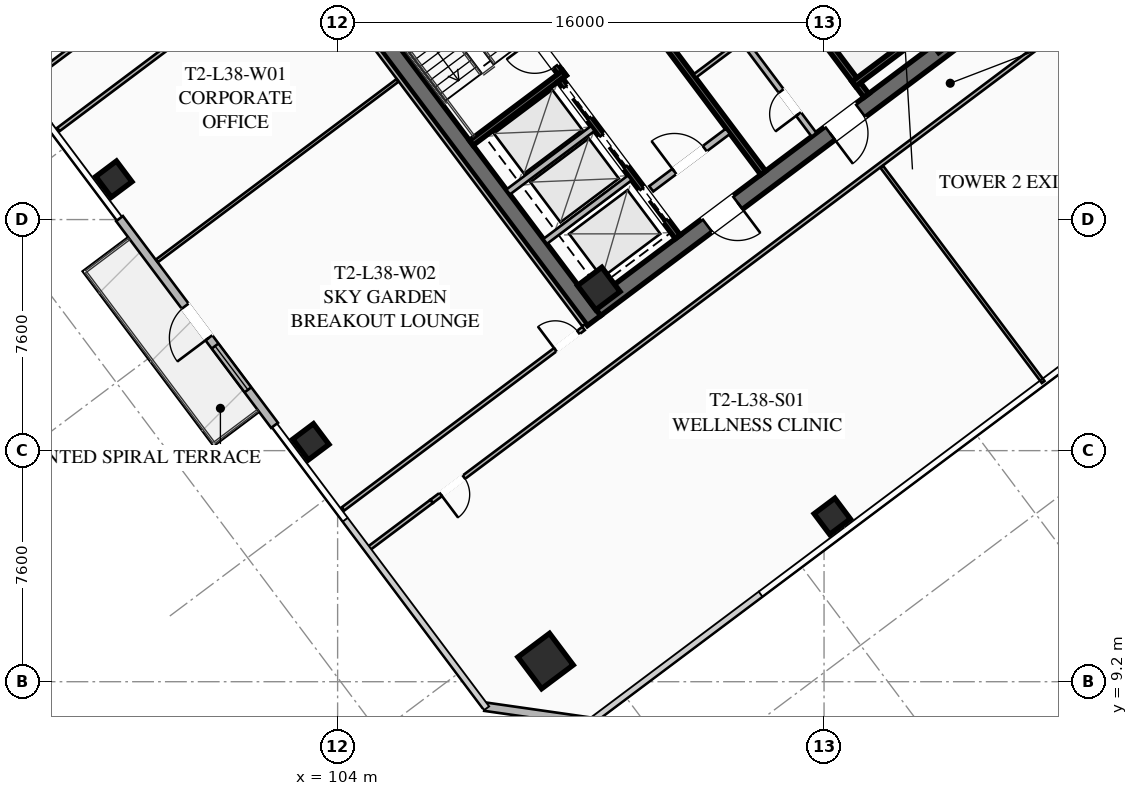
"""IFC4 building model, lengths in metres.
Left out: names, types, materials, properties, quantities, classifications, styles, units other than length and angle.
Written with IfcOpenShell. Run it as: python <this file> out.ifc"""

import sys

from ifc_helpers import new_model, si_unit, direction, frame, frame_2d, origin, origin_2d, place, context, subcontext, project, spatial, rectangle, hollow_rectangle, extrude, element, fill, save


model = new_model("IFC4")
c1 = context("Model", 3, precision=1e-05, world=origin(), true_north=direction((0.0, 1.0)))
c2 = subcontext(c1, "Body", "Model", "MODEL_VIEW")
j1 = project(units=[si_unit("LENGTHUNIT", "METRE"), si_unit("PLANEANGLEUNIT", "RADIAN")], contexts=[c1])
p1 = place(None, origin())
s1 = spatial("IfcSite", under=j1, at=p1, CompositionType="ELEMENT")
p2 = place(p1, origin())
s2 = spatial("IfcBuilding", under=s1, at=p2, CompositionType="ELEMENT")
p3 = place(p2, frame((0.0, 0.0, 142.8)))
s3 = spatial("IfcBuildingStorey", under=s2, at=p3, CompositionType="ELEMENT", Elevation=142.8)
p4 = place(p3, frame((112.436, 21.077, 0.0), z_axis=(0.0, 0.0, 1.0), x_axis=(-0.600005007985, 0.799996243986, 0.0)))
e1 = element("IfcWall", 1, at=p4, inside=s3, PredefinedType="SHEAR", context=c2, shape_type="SweptSolid", body=[
    extrude(rectangle(XDim=15.6, YDim=0.55, at=frame_2d((7.8, 0.0))), origin(), (0.0, 0.0, 1.0), 3.55),
])
p5 = place(p3, frame((124.539, 30.498, 0.0), z_axis=(0.0, 0.0, 1.0), x_axis=(-0.799998054672, -0.600002593761, 0.0)))
e2 = element("IfcWall", 2, at=p5, inside=s3, PredefinedType="SHEAR", context=c2, shape_type="SweptSolid", body=[
    extrude(rectangle(XDim=15.06, YDim=0.55, at=frame_2d((7.53, 0.0))), origin(), (0.0, 0.0, 1.0), 3.55),
])
p6 = place(p5, frame((9.23, 0.0, 0.0)))
e3 = element("IfcOpeningElement", 3, at=p6, cuts=e2, PredefinedType="OPENING", context=c2, shape_type="SweptSolid", body=[
    extrude(rectangle(XDim=1.25, YDim=2.25, at=frame_2d((0.625, 1.125))), frame((0.0, 0.285, 0.0), z_axis=(0.0, -1.0, 0.0), x_axis=(1.0, 0.0, 0.0)), (0.0, 0.0, 1.0), 0.57),
])
p7 = place(p5, frame((4.18, 0.0, 0.0)))
e4 = element("IfcOpeningElement", 4, at=p7, cuts=e2, PredefinedType="OPENING", context=c2, shape_type="SweptSolid", body=[
    extrude(rectangle(XDim=1.25, YDim=2.25, at=frame_2d((0.625, 1.125))), frame((0.0, 0.285, 0.0), z_axis=(0.0, -1.0, 0.0), x_axis=(1.0, 0.0, 0.0)), (0.0, 0.0, 1.0), 0.57),
])
for number, where, z_axis, x_axis in (
    (5, (112.59, 22.13, 0.0), (0.0, 0.0, 1.0), (0.8, 0.6, 0.0)),
    (6, (123.87, 30.59, 0.0), (0.0, 0.0, 1.0), (0.8, 0.6, 0.0)),
):
    element("IfcColumn", number, at=place(p3, frame(where, z_axis=z_axis, x_axis=x_axis)), inside=s3, PredefinedType="COLUMN", context=c2, shape_type="SweptSolid", body=[
        extrude(hollow_rectangle(XDim=1.0, YDim=1.0, WallThickness=0.04, at=origin_2d()), origin(), (0.0, 0.0, 1.0), 3.37),
    ])
p8 = place(p3, frame((110.84, 9.88, 0.0), z_axis=(0.0, 0.0, 1.0), x_axis=(0.799999996291, 0.600000004945, 0.0)))
e7 = element("IfcColumn", 7, at=p8, inside=s3, PredefinedType="COLUMN", context=c2, shape_type="SweptSolid", body=[
    extrude(hollow_rectangle(XDim=1.3, YDim=1.3, WallThickness=0.05, at=origin_2d()), origin(), (0.0, 0.0, 1.0), 3.37),
])
for number, where, z_axis, x_axis in (
    (8, (120.27, 14.64, 0.0), (0.0, 0.0, 1.0), (0.8, 0.6, 0.0)),
    (9, (96.64, 25.73, 0.0), (0.0, 0.0, 1.0), (0.8, 0.6, 0.0)),
    (10, (103.12, 17.09, 0.0), (0.0, 0.0, 1.0), (0.8, 0.6, 0.0)),
):
    element("IfcColumn", number, at=place(p3, frame(where, z_axis=z_axis, x_axis=x_axis)), inside=s3, PredefinedType="COLUMN", context=c2, shape_type="SweptSolid", body=[
        extrude(hollow_rectangle(XDim=0.85, YDim=0.85, WallThickness=0.035, at=origin_2d()), origin(), (0.0, 0.0, 1.0), 3.37),
    ])
p9 = place(p3, frame((101.926, 17.632, 0.0), z_axis=(0.0, 0.0, 1.0), x_axis=(-0.600018382406, 0.799986212866, 0.0)))
e11 = element("IfcWall", 11, at=p9, inside=s3, PredefinedType="SOLIDWALL", context=c2, shape_type="SweptSolid", body=[
    extrude(rectangle(XDim=8.5, YDim=0.28, at=frame_2d((4.25, 0.0))), origin(), (0.0, 0.0, 1.0), 3.37),
])
p10 = place(p9, frame((3.6, 0.0, 0.0)))
e12 = element("IfcOpeningElement", 12, at=p10, cuts=e11, PredefinedType="OPENING", context=c2, shape_type="SweptSolid", body=[
    extrude(rectangle(XDim=1.3, YDim=2.15, at=frame_2d((0.65, 1.075))), frame((0.0, 0.15, 0.0), z_axis=(0.0, -1.0, 0.0), x_axis=(1.0, 0.0, 0.0)), (0.0, 0.0, 1.0), 0.3),
])
p11 = place(p9, frame((1.46, 0.0, 0.85)))
e13 = element("IfcOpeningElement", 13, at=p11, cuts=e11, PredefinedType="OPENING", context=c2, shape_type="SweptSolid", body=[
    extrude(rectangle(XDim=1.8, YDim=1.92, at=frame_2d((0.9, 0.96))), frame((0.0, 0.15, 0.0), z_axis=(0.0, -1.0, 0.0), x_axis=(1.0, 0.0, 0.0)), (0.0, 0.0, 1.0), 0.3),
])
p12 = place(p3, frame((112.34, 7.88, 0.0), z_axis=(0.0, 0.0, 1.0), x_axis=(-0.989949493661, 0.141421356237, 0.0)))
e14 = element("IfcWall", 14, at=p12, inside=s3, PredefinedType="SOLIDWALL", context=c2, shape_type="SweptSolid", body=[
    extrude(rectangle(XDim=3.536, YDim=0.28, at=frame_2d((1.768, 0.0))), origin(), (0.0, 0.0, 1.0), 3.37),
])
p13 = place(p3, frame((111.44, 29.08, 0.0), z_axis=(0.0, 0.0, 1.0), x_axis=(-0.59999029481, 0.8000072788, 0.0)))
e15 = element("IfcWall", 15, at=p13, inside=s3, PredefinedType="SHEAR", context=c2, shape_type="SweptSolid", body=[
    extrude(rectangle(XDim=8.05, YDim=0.2, at=frame_2d((4.025, 0.0))), origin(), (0.0, 0.0, 1.0), 3.37),
])
p14 = place(p13, frame((0.45, 0.0, 0.0)))
e16 = element("IfcOpeningElement", 16, at=p14, cuts=e15, PredefinedType="OPENING", context=c2, shape_type="SweptSolid", body=[
    extrude(rectangle(XDim=1.15, YDim=2.2, at=frame_2d((0.575, 1.1))), frame((0.0, 0.11, 0.0), z_axis=(0.0, -1.0, 0.0), x_axis=(1.0, 0.0, 0.0)), (0.0, 0.0, 1.0), 0.22),
])
p15 = place(p3, frame((108.396, 26.922, 0.0), z_axis=(0.0, 0.0, 1.0), x_axis=(0.800015298837, 0.599979601008, 0.0)))
e17 = element("IfcWall", 17, at=p15, inside=s3, PredefinedType="SHEAR", context=c2, shape_type="SweptSolid", body=[
    extrude(rectangle(XDim=3.83, YDim=0.2, at=frame_2d((1.915, 0.0))), origin(), (0.0, 0.0, 1.0), 3.37),
])
p16 = place(p3, frame((116.56, 34.92, 0.0), z_axis=(0.0, 0.0, 1.0), x_axis=(0.59999029481, -0.8000072788, 0.0)))
e18 = element("IfcWall", 18, at=p16, inside=s3, PredefinedType="SHEAR", context=c2, shape_type="SweptSolid", body=[
    extrude(rectangle(XDim=8.05, YDim=0.2, at=frame_2d((4.025, 0.0))), origin(), (0.0, 0.0, 1.0), 3.37),
])
p17 = place(p16, frame((0.45, 0.0, 0.0)))
e19 = element("IfcOpeningElement", 19, at=p17, cuts=e18, PredefinedType="OPENING", context=c2, shape_type="SweptSolid", body=[
    extrude(rectangle(XDim=1.15, YDim=2.2, at=frame_2d((0.575, 1.1))), frame((0.0, 0.11, 0.0), z_axis=(0.0, -1.0, 0.0), x_axis=(1.0, 0.0, 0.0)), (0.0, 0.0, 1.0), 0.22),
])
p18 = place(p3, frame((120.98, 28.86, 0.0), z_axis=(0.0, 0.0, 1.0), x_axis=(0.800015298837, 0.599979601008, 0.0)))
e20 = element("IfcWall", 20, at=p18, inside=s3, PredefinedType="SHEAR", context=c2, shape_type="SweptSolid", body=[
    extrude(rectangle(XDim=3.83, YDim=0.2, at=frame_2d((1.915, 0.0))), origin(), (0.0, 0.0, 1.0), 3.37),
])
p19 = place(p3, frame((117.998, 25.936, 0.0), z_axis=(0.0, 0.0, 1.0), x_axis=(-0.600002693989, 0.799997979501, 0.0)))
e21 = element("IfcWall", 21, at=p19, inside=s3, PredefinedType="SHEAR", context=c2, shape_type="SweptSolid", body=[
    extrude(rectangle(XDim=14.5, YDim=0.2, at=frame_2d((7.25, 0.0))), origin(), (0.0, 0.0, 1.0), 3.37),
])
p20 = place(p3, frame((114.316, 25.412, 0.0), z_axis=(0.0, 0.0, 1.0), x_axis=(0.800018601094, 0.59997519774, 0.0)))
e22 = element("IfcWall", 22, at=p20, inside=s3, PredefinedType="SOLIDWALL", context=c2, shape_type="SweptSolid", body=[
    extrude(rectangle(XDim=3.15, YDim=0.22, at=frame_2d((1.575, 0.0))), origin(), (0.0, 0.0, 1.0), 2.723),
])
p21 = place(p20, frame((0.95, 0.0, 0.0)))
e23 = element("IfcOpeningElement", 23, at=p21, cuts=e22, PredefinedType="OPENING", context=c2, shape_type="SweptSolid", body=[
    extrude(rectangle(XDim=1.25, YDim=2.25, at=frame_2d((0.625, 1.125))), frame((0.0, 0.12, 0.0), z_axis=(0.0, -1.0, 0.0), x_axis=(1.0, 0.0, 0.0)), (0.0, 0.0, 1.0), 0.24),
])
p22 = place(p3, frame((115.19, 23.83, 0.0), z_axis=(0.0, 0.0, 1.0), x_axis=(-0.599993943644, 0.800004542231, 0.0)))
e24 = element("IfcWall", 24, at=p22, inside=s3, PredefinedType="SHEAR", context=c2, shape_type="SweptSolid", body=[
    extrude(rectangle(XDim=6.45, YDim=0.2, at=frame_2d((3.225, 0.0))), origin(), (0.0, 0.0, 1.0), 3.37),
])
p23 = place(p22, frame((4.875, 0.0, 0.0)))
e25 = element("IfcOpeningElement", 25, at=p23, cuts=e24, PredefinedType="OPENING", context=c2, shape_type="SweptSolid", body=[
    extrude(rectangle(XDim=1.3, YDim=2.25, at=frame_2d((0.65, 1.125))), frame((0.0, 0.11, 0.0), z_axis=(0.0, -1.0, 0.0), x_axis=(1.0, 0.0, 0.0)), (0.0, 0.0, 1.0), 0.22),
])
p24 = place(p22, frame((2.875, 0.0, 0.0)))
e26 = element("IfcOpeningElement", 26, at=p24, cuts=e24, PredefinedType="OPENING", context=c2, shape_type="SweptSolid", body=[
    extrude(rectangle(XDim=1.3, YDim=2.25, at=frame_2d((0.65, 1.125))), frame((0.0, 0.11, 0.0), z_axis=(0.0, -1.0, 0.0), x_axis=(1.0, 0.0, 0.0)), (0.0, 0.0, 1.0), 0.22),
])
p25 = place(p22, frame((0.675, 0.0, 0.0)))
e27 = element("IfcOpeningElement", 27, at=p25, cuts=e24, PredefinedType="OPENING", context=c2, shape_type="SweptSolid", body=[
    extrude(rectangle(XDim=1.3, YDim=2.25, at=frame_2d((0.65, 1.125))), frame((0.0, 0.11, 0.0), z_axis=(0.0, -1.0, 0.0), x_axis=(1.0, 0.0, 0.0)), (0.0, 0.0, 1.0), 0.22),
])
for number, where, z_axis, x_axis in (
    (28, (110.826, 23.682, 0.0), (0.0, 0.0, 1.0), (0.8, 0.6, 0.0)),
    (29, (109.608, 25.306, 0.0), (0.0, 0.0, 1.0), (0.8, 0.6, 0.0)),
):
    element("IfcWall", number, at=place(p3, frame(where, z_axis=z_axis, x_axis=x_axis)), inside=s3, PredefinedType="SOLIDWALL", context=c2, shape_type="SweptSolid", body=[
        extrude(rectangle(XDim=3.48, YDim=0.2, at=frame_2d((1.74, 0.0))), origin(), (0.0, 0.0, 1.0), 3.37),
    ])
p26 = place(p3, frame((119.67, 27.19, 0.0), z_axis=(0.0, 0.0, 1.0), x_axis=(-0.599988677396, 0.800008491828, 0.0)))
e30 = element("IfcWall", 30, at=p26, inside=s3, PredefinedType="SOLIDWALL", context=c2, shape_type="SweptSolid", body=[
    extrude(rectangle(XDim=6.9, YDim=0.2, at=frame_2d((3.45, 0.0))), origin(), (0.0, 0.0, 1.0), 2.723),
])
p27 = place(p26, frame((0.85, 0.0, 0.0)))
e31 = element("IfcOpeningElement", 31, at=p27, cuts=e30, PredefinedType="OPENING", context=c2, shape_type="SweptSolid", body=[
    extrude(rectangle(XDim=0.95, YDim=2.05, at=frame_2d((0.475, 1.025))), frame((0.0, 0.11, 0.0), z_axis=(0.0, -1.0, 0.0), x_axis=(1.0, 0.0, 0.0)), (0.0, 0.0, 1.0), 0.22),
])
p28 = place(p26, frame((4.8, 0.0, 0.0)))
e32 = element("IfcOpeningElement", 32, at=p28, cuts=e30, PredefinedType="OPENING", context=c2, shape_type="SweptSolid", body=[
    extrude(rectangle(XDim=1.05, YDim=2.2, at=frame_2d((0.525, 1.1))), frame((0.0, 0.11, 0.0), z_axis=(0.0, -1.0, 0.0), x_axis=(1.0, 0.0, 0.0)), (0.0, 0.0, 1.0), 0.22),
])
p29 = place(p3, frame((115.746, 29.122, 0.0), z_axis=(0.0, 0.0, 1.0), x_axis=(0.8, 0.6, 0.0)))
e33 = element("IfcWall", 33, at=p29, inside=s3, PredefinedType="PARTITIONING", context=c2, shape_type="SweptSolid", body=[
    extrude(rectangle(XDim=1.88, YDim=0.135, at=frame_2d((0.94, 0.0))), origin(), (0.0, 0.0, 1.0), 2.723),
])
p30 = place(p3, frame((93.574, 28.768, 0.0), z_axis=(0.0, 0.0, 1.0), x_axis=(0.80002227902, 0.599970293491, 0.0)))
e34 = element("IfcWall", 34, at=p30, inside=s3, PredefinedType="PARTITIONING", context=c2, shape_type="SweptSolid", body=[
    extrude(rectangle(XDim=2.63, YDim=0.135, at=frame_2d((1.315, 0.0))), origin(), (0.0, 0.0, 1.0), 2.723),
])
p31 = place(p3, frame((132.13, 33.91, 0.0), z_axis=(0.0, 0.0, 1.0), x_axis=(-0.799997191971, -0.600003744021, 0.0)))
e35 = element("IfcWall", 35, at=p31, inside=s3, PredefinedType="PARTITIONING", context=c2, shape_type="SweptSolid", body=[
    extrude(rectangle(XDim=31.3, YDim=0.135, at=frame_2d((15.65, 0.0))), origin(), (0.0, 0.0, 1.0), 2.723),
])
p32 = place(p31, frame((29.97, 0.0, 0.0)))
e36 = element("IfcOpeningElement", 36, at=p32, cuts=e35, PredefinedType="OPENING", context=c2, shape_type="SweptSolid", body=[
    extrude(rectangle(XDim=0.95, YDim=2.05, at=frame_2d((0.475, 1.025))), frame((0.0, 0.077, 0.0), z_axis=(0.0, -1.0, 0.0), x_axis=(1.0, 0.0, 0.0)), (0.0, 0.0, 1.0), 0.155),
])
p33 = place(p31, frame((0.38, 0.0, 0.0)))
e37 = element("IfcOpeningElement", 37, at=p33, cuts=e35, PredefinedType="OPENING", context=c2, shape_type="SweptSolid", body=[
    extrude(rectangle(XDim=0.95, YDim=2.05, at=frame_2d((0.475, 1.025))), frame((0.0, 0.077, 0.0), z_axis=(0.0, -1.0, 0.0), x_axis=(1.0, 0.0, 0.0)), (0.0, 0.0, 1.0), 0.155),
])
p34 = place(p3, frame((104.986, 13.552, 0.0), z_axis=(0.0, 0.0, 1.0), x_axis=(0.80002227902, 0.599970293491, 0.0)))
e38 = element("IfcWall", 38, at=p34, inside=s3, PredefinedType="PARTITIONING", context=c2, shape_type="SweptSolid", body=[
    extrude(rectangle(XDim=2.63, YDim=0.135, at=frame_2d((1.315, 0.0))), origin(), (0.0, 0.0, 1.0), 2.723),
])
p35 = place(p3, frame((127.208, 19.056, 0.0), z_axis=(0.0, 0.0, 1.0), x_axis=(-0.6, 0.8, 0.0)))
e39 = element("IfcWall", 39, at=p35, inside=s3, PredefinedType="PARTITIONING", context=c2, shape_type="SweptSolid", body=[
    extrude(rectangle(XDim=8.85, YDim=0.11, at=frame_2d((4.425, 0.0))), origin(), (0.0, 0.0, 1.0), 2.723),
])
p36 = place(p3, frame((112.104, 20.928, 0.0), z_axis=(0.0, 0.0, 1.0), x_axis=(-0.599994940075, 0.800003794918, 0.0)))
e40 = element("IfcWall", 40, at=p36, inside=s3, PredefinedType="PARTITIONING", context=c2, shape_type="SweptSolid", body=[
    extrude(rectangle(XDim=15.44, YDim=0.135, at=frame_2d((7.72, 0.0))), origin(), (0.0, 0.0, 1.0), 2.723),
])
p37 = place(p3, frame((102.728, 33.296, 0.0), z_axis=(0.0, 0.0, 1.0), x_axis=(-0.800011848946, -0.599984201081, 0.0)))
e41 = element("IfcWall", 41, at=p37, inside=s3, PredefinedType="PARTITIONING", context=c2, shape_type="SweptSolid", body=[
    extrude(rectangle(XDim=9.89, YDim=0.135, at=frame_2d((4.945, 0.0))), origin(), (0.0, 0.0, 1.0), 2.723),
])
p38 = place(p37, frame((0.5, 0.0, 0.0)))
e42 = element("IfcOpeningElement", 42, at=p38, cuts=e41, PredefinedType="OPENING", context=c2, shape_type="SweptSolid", body=[
    extrude(rectangle(XDim=0.95, YDim=2.05, at=frame_2d((0.475, 1.025))), frame((0.0, 0.077, 0.0), z_axis=(0.0, -1.0, 0.0), x_axis=(1.0, 0.0, 0.0)), (0.0, 0.0, 1.0), 0.155),
])
p39 = place(p3, frame((104.176, 14.882, 0.0), z_axis=(0.0, 0.0, 1.0), x_axis=(0.800002962324, 0.599996050214, 0.0)))
e43 = element("IfcWall", 43, at=p39, inside=s3, PredefinedType="PARTITIONING", context=c2, shape_type="SweptSolid", body=[
    extrude(rectangle(XDim=9.89, YDim=0.135, at=frame_2d((4.945, 0.0))), origin(), (0.0, 0.0, 1.0), 2.723),
])
p40 = place(p39, frame((8.73, 0.0, 0.0)))
e44 = element("IfcOpeningElement", 44, at=p40, cuts=e43, PredefinedType="OPENING", context=c2, shape_type="SweptSolid", body=[
    extrude(rectangle(XDim=0.95, YDim=2.05, at=frame_2d((0.475, 1.025))), frame((0.0, 0.077, 0.0), z_axis=(0.0, -1.0, 0.0), x_axis=(1.0, 0.0, 0.0)), (0.0, 0.0, 1.0), 0.155),
])
p41 = place(p3, frame((98.056, 23.042, 0.0), z_axis=(0.0, 0.0, 1.0), x_axis=(0.8, 0.6, 0.0)))
e45 = element("IfcWall", 45, at=p41, inside=s3, PredefinedType="PARTITIONING", context=c2, shape_type="SweptSolid", body=[
    extrude(rectangle(XDim=9.89, YDim=0.11, at=frame_2d((4.945, 0.0))), origin(), (0.0, 0.0, 1.0), 2.723),
])
p42 = place(p10, origin())
e46 = element("IfcDoor", 46, at=p42, inside=s3, OperationType="SINGLE_SWING_LEFT", PredefinedType="DOOR", context=c2, shape_type="SweptSolid", body=[
    extrude(rectangle(XDim=1.3, YDim=2.15, at=frame_2d((0.65, 1.075))), frame((0.0, 0.025, 0.0), z_axis=(0.0, -1.0, 0.0), x_axis=(1.0, 0.0, 0.0)), (0.0, 0.0, 1.0), 0.05),
])
fill(e12, e46)
p43 = place(p11, origin())
e47 = element("IfcWindow", 47, at=p43, inside=s3, PartitioningType="SINGLE_PANEL", PredefinedType="WINDOW", context=c2, shape_type="SweptSolid", body=[
    extrude(rectangle(XDim=1.8, YDim=1.92, at=frame_2d((0.9, 0.96))), frame((0.0, 0.03, 0.0), z_axis=(0.0, -1.0, 0.0), x_axis=(1.0, 0.0, 0.0)), (0.0, 0.0, 1.0), 0.06),
])
fill(e13, e47)
p44 = place(p6, origin())
e48 = element("IfcDoor", 48, at=p44, inside=s3, OperationType="SINGLE_SWING_LEFT", PredefinedType="DOOR", context=c2, shape_type="SweptSolid", body=[
    extrude(rectangle(XDim=1.25, YDim=2.25, at=frame_2d((0.625, 1.125))), frame((0.0, 0.025, 0.0), z_axis=(0.0, -1.0, 0.0), x_axis=(1.0, 0.0, 0.0)), (0.0, 0.0, 1.0), 0.05),
])
fill(e3, e48)
p45 = place(p7, origin())
e49 = element("IfcDoor", 49, at=p45, inside=s3, OperationType="SINGLE_SWING_RIGHT", PredefinedType="DOOR", context=c2, shape_type="SweptSolid", body=[
    extrude(rectangle(XDim=1.25, YDim=2.25, at=frame_2d((0.625, 1.125))), frame((0.0, 0.025, 0.0), z_axis=(0.0, -1.0, 0.0), x_axis=(1.0, 0.0, 0.0)), (0.0, 0.0, 1.0), 0.05),
])
fill(e4, e49)
p46 = place(p14, origin())
e50 = element("IfcDoor", 50, at=p46, inside=s3, OperationType="SINGLE_SWING_RIGHT", PredefinedType="DOOR", context=c2, shape_type="SweptSolid", body=[
    extrude(rectangle(XDim=1.15, YDim=2.2, at=frame_2d((0.575, 1.1))), frame((0.0, 0.025, 0.0), z_axis=(0.0, -1.0, 0.0), x_axis=(1.0, 0.0, 0.0)), (0.0, 0.0, 1.0), 0.05),
])
fill(e16, e50)
p47 = place(p21, origin())
e51 = element("IfcDoor", 51, at=p47, inside=s3, OperationType="SINGLE_SWING_LEFT", PredefinedType="DOOR", context=c2, shape_type="SweptSolid", body=[
    extrude(rectangle(XDim=1.25, YDim=2.25, at=frame_2d((0.625, 1.125))), frame((0.0, 0.025, 0.0), z_axis=(0.0, -1.0, 0.0), x_axis=(1.0, 0.0, 0.0)), (0.0, 0.0, 1.0), 0.05),
])
fill(e23, e51)
p48 = place(p27, origin())
e52 = element("IfcDoor", 52, at=p48, inside=s3, OperationType="SINGLE_SWING_LEFT", PredefinedType="DOOR", context=c2, shape_type="SweptSolid", body=[
    extrude(rectangle(XDim=0.95, YDim=2.05, at=frame_2d((0.475, 1.025))), frame((0.0, 0.025, 0.0), z_axis=(0.0, -1.0, 0.0), x_axis=(1.0, 0.0, 0.0)), (0.0, 0.0, 1.0), 0.05),
])
fill(e31, e52)
p49 = place(p32, origin())
e53 = element("IfcDoor", 53, at=p49, inside=s3, OperationType="SINGLE_SWING_RIGHT", PredefinedType="DOOR", context=c2, shape_type="SweptSolid", body=[
    extrude(rectangle(XDim=0.95, YDim=2.05, at=frame_2d((0.475, 1.025))), frame((0.0, 0.025, 0.0), z_axis=(0.0, -1.0, 0.0), x_axis=(1.0, 0.0, 0.0)), (0.0, 0.0, 1.0), 0.05),
])
fill(e36, e53)
p50 = place(p40, origin())
e54 = element("IfcDoor", 54, at=p50, inside=s3, OperationType="SINGLE_SWING_LEFT", PredefinedType="DOOR", context=c2, shape_type="SweptSolid", body=[
    extrude(rectangle(XDim=0.95, YDim=2.05, at=frame_2d((0.475, 1.025))), frame((0.0, 0.025, 0.0), z_axis=(0.0, -1.0, 0.0), x_axis=(1.0, 0.0, 0.0)), (0.0, 0.0, 1.0), 0.05),
])
fill(e44, e54)
p51 = place(p23, origin())
e55 = element("IfcDoor", 55, at=p51, inside=s3, OperationType="SLIDING_TO_LEFT", PredefinedType="DOOR", context=c2, shape_type="SweptSolid", body=[
    extrude(rectangle(XDim=1.3, YDim=2.25, at=frame_2d((0.65, 1.125))), frame((0.0, 0.025, 0.0), z_axis=(0.0, -1.0, 0.0), x_axis=(1.0, 0.0, 0.0)), (0.0, 0.0, 1.0), 0.05),
])
fill(e25, e55)
p52 = place(p24, origin())
e56 = element("IfcDoor", 56, at=p52, inside=s3, OperationType="SLIDING_TO_LEFT", PredefinedType="DOOR", context=c2, shape_type="SweptSolid", body=[
    extrude(rectangle(XDim=1.3, YDim=2.25, at=frame_2d((0.65, 1.125))), frame((0.0, 0.025, 0.0), z_axis=(0.0, -1.0, 0.0), x_axis=(1.0, 0.0, 0.0)), (0.0, 0.0, 1.0), 0.05),
])
fill(e26, e56)
p53 = place(p25, origin())
e57 = element("IfcDoor", 57, at=p53, inside=s3, OperationType="SLIDING_TO_LEFT", PredefinedType="DOOR", context=c2, shape_type="SweptSolid", body=[
    extrude(rectangle(XDim=1.3, YDim=2.25, at=frame_2d((0.65, 1.125))), frame((0.0, 0.025, 0.0), z_axis=(0.0, -1.0, 0.0), x_axis=(1.0, 0.0, 0.0)), (0.0, 0.0, 1.0), 0.05),
])
fill(e27, e57)
save(model, sys.argv[1])
